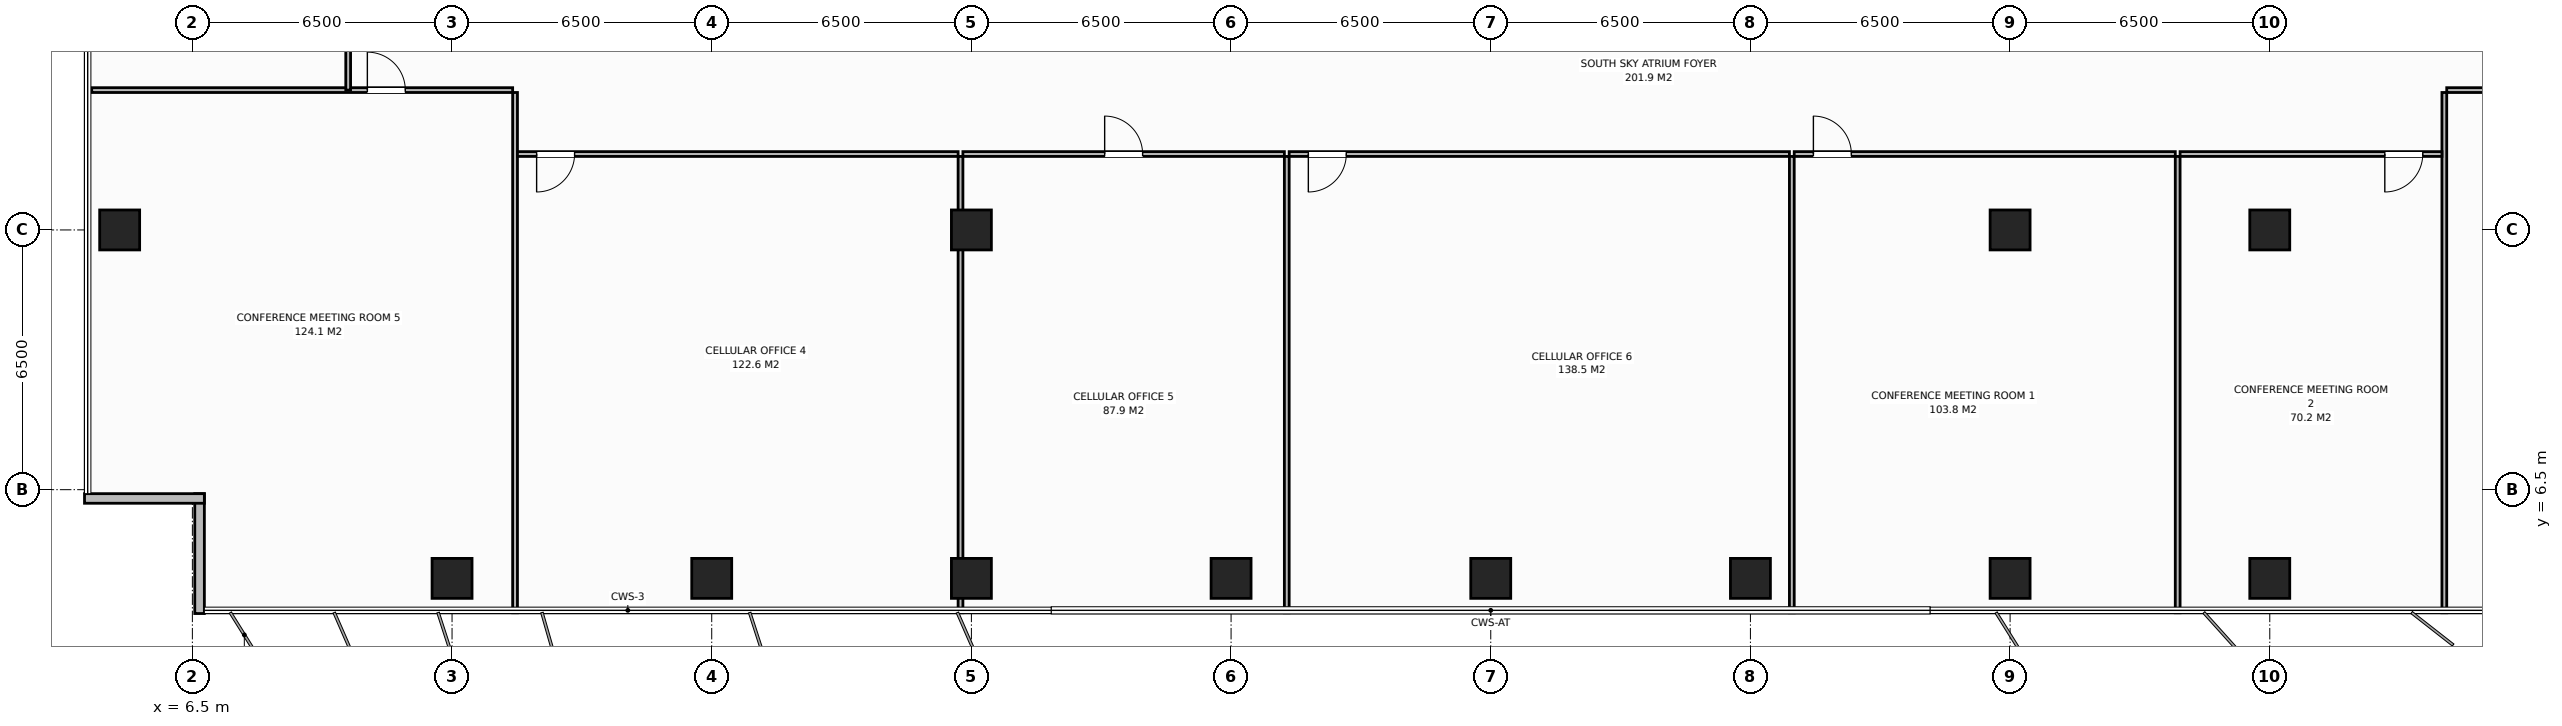
"""IFC4 building model, lengths in metres.
Left out: names, types, materials, properties, quantities, classifications, styles, units other than length and angle.
Written with IfcOpenShell. Run it as: python <this file> out.ifc"""

import sys

from ifc_helpers import new_model, si_unit, direction, frame, frame_2d, origin, origin_2d, place, context, subcontext, project, spatial, rectangle, extrude, element, fill, save


model = new_model("IFC4")
c1 = context("Model", 3, precision=1e-05, world=origin(), true_north=direction((0.0, 1.0)))
c2 = subcontext(c1, "Body", "Model", "MODEL_VIEW")
j1 = project(units=[si_unit("LENGTHUNIT", "METRE"), si_unit("PLANEANGLEUNIT", "RADIAN")], contexts=[c1])
p1 = place(None, origin())
s1 = spatial("IfcSite", under=j1, at=p1, CompositionType="ELEMENT")
p2 = place(p1, origin())
s2 = spatial("IfcBuilding", under=s1, at=p2, CompositionType="ELEMENT")
p3 = place(p2, frame((0.0, 0.0, 193.6)))
s3 = spatial("IfcBuildingStorey", under=s2, at=p3, CompositionType="ELEMENT", Elevation=193.6)
for number, where, z_axis, x_axis in (
    (1, (58.5, 13.0, 0.0), (0.0, 0.0, 1.0), (1.0, 0.0, 0.0)),
    (2, (26.0, 13.0, 0.0), (0.0, 0.0, 1.0), (1.0, 0.0, 0.0)),
    (3, (52.0, 13.0, 0.0), (0.0, 0.0, 1.0), (1.0, 0.0, 0.0)),
    (4, (13.0, 4.28, 0.0), (0.0, 0.0, 1.0), (1.0, 0.0, 0.0)),
    (5, (19.5, 4.28, 0.0), (0.0, 0.0, 1.0), (1.0, 0.0, 0.0)),
    (6, (26.0, 4.28, 0.0), (0.0, 0.0, 1.0), (1.0, 0.0, 0.0)),
    (7, (32.5, 4.28, 0.0), (0.0, 0.0, 1.0), (1.0, 0.0, 0.0)),
    (8, (39.0, 4.28, 0.0), (0.0, 0.0, 1.0), (1.0, 0.0, 0.0)),
    (9, (45.5, 4.28, 0.0), (0.0, 0.0, 1.0), (1.0, 0.0, 0.0)),
    (10, (52.0, 4.28, 0.0), (0.0, 0.0, 1.0), (1.0, 0.0, 0.0)),
    (11, (58.5, 4.28, 0.0), (0.0, 0.0, 1.0), (1.0, 0.0, 0.0)),
    (12, (4.68, 13.0, 0.0), (0.0, 0.0, 1.0), (1.0, 0.0, 0.0)),
):
    element("IfcColumn", number, at=place(p3, frame(where, z_axis=z_axis, x_axis=x_axis)), inside=s3, PredefinedType="COLUMN", context=c2, shape_type="SweptSolid", body=[
        extrude(rectangle(XDim=1.0, YDim=1.0, at=origin_2d()), origin(), (0.0, 0.0, 1.0), 3.8),
    ])
for number, where, z_axis, x_axis in (
    (13, (6.68, 3.4, 0.0), (0.0, 0.0, 1.0), (0.0, 1.0, 0.0)),
    (14, (6.8, 6.28, 0.0), (0.0, 0.0, 1.0), (-1.0, 0.0, 0.0)),
):
    element("IfcWall", number, at=place(p3, frame(where, z_axis=z_axis, x_axis=x_axis)), inside=s3, PredefinedType="STANDARD", context=c2, shape_type="SweptSolid", body=[
        extrude(rectangle(XDim=3.0, YDim=0.24, at=frame_2d((1.5, 0.0))), origin(), (0.0, 0.0, 1.0), 3.52),
    ])
p4 = place(p3, frame((14.577, 3.42, 0.0), z_axis=(0.0, 0.0, 1.0), x_axis=(0.0, 1.0, 0.0)))
e15 = element("IfcWall", 15, at=p4, inside=s3, PredefinedType="PARTITIONING", context=c2, shape_type="SweptSolid", body=[
    extrude(rectangle(XDim=13.02, YDim=0.12, at=frame_2d((6.51, 0.0))), origin(), (0.0, 0.0, 1.0), 3.52),
])
p5 = place(p3, frame((3.98, 16.5, 0.0), z_axis=(0.0, 0.0, 1.0), x_axis=(1.0, 0.0, 0.0)))
e16 = element("IfcWall", 16, at=p5, inside=s3, PredefinedType="PARTITIONING", context=c2, shape_type="SweptSolid", body=[
    extrude(rectangle(XDim=10.537, YDim=0.12, at=frame_2d((5.269, 0.0))), origin(), (0.0, 0.0, 1.0), 3.52),
])
p6 = place(p5, frame((6.9, 0.0, 0.0)))
e17 = element("IfcOpeningElement", 17, at=p6, cuts=e16, PredefinedType="OPENING", context=c2, shape_type="SweptSolid", body=[
    extrude(rectangle(XDim=0.95, YDim=2.15, at=frame_2d((0.475, 1.075))), frame((0.0, 0.07, 0.0), z_axis=(0.0, -1.0, 0.0), x_axis=(1.0, 0.0, 0.0)), (0.0, 0.0, 1.0), 0.14),
])
p7 = place(p3, frame((25.727, 3.42, 0.0), z_axis=(0.0, 0.0, 1.0), x_axis=(0.0, 1.0, 0.0)))
e18 = element("IfcWall", 18, at=p7, inside=s3, PredefinedType="PARTITIONING", context=c2, shape_type="SweptSolid", body=[
    extrude(rectangle(XDim=11.42, YDim=0.12, at=frame_2d((5.71, 0.0))), origin(), (0.0, 0.0, 1.0), 3.52),
])
p8 = place(p3, frame((14.637, 14.9, 0.0), z_axis=(0.0, 0.0, 1.0), x_axis=(1.0, 0.0, 0.0)))
e19 = element("IfcWall", 19, at=p8, inside=s3, PredefinedType="PARTITIONING", context=c2, shape_type="SweptSolid", body=[
    extrude(rectangle(XDim=11.03, YDim=0.12, at=frame_2d((5.515, 0.0))), origin(), (0.0, 0.0, 1.0), 3.52),
])
p9 = place(p8, frame((0.48, 0.0, 0.0)))
e20 = element("IfcOpeningElement", 20, at=p9, cuts=e19, PredefinedType="OPENING", context=c2, shape_type="SweptSolid", body=[
    extrude(rectangle(XDim=0.95, YDim=2.15, at=frame_2d((0.475, 1.075))), frame((0.0, 0.07, 0.0), z_axis=(0.0, -1.0, 0.0), x_axis=(1.0, 0.0, 0.0)), (0.0, 0.0, 1.0), 0.14),
])
p10 = place(p3, frame((33.894, 3.42, 0.0), z_axis=(0.0, 0.0, 1.0), x_axis=(0.0, 1.0, 0.0)))
e21 = element("IfcWall", 21, at=p10, inside=s3, PredefinedType="PARTITIONING", context=c2, shape_type="SweptSolid", body=[
    extrude(rectangle(XDim=11.42, YDim=0.12, at=frame_2d((5.71, 0.0))), origin(), (0.0, 0.0, 1.0), 3.52),
])
p11 = place(p3, frame((25.787, 14.9, 0.0), z_axis=(0.0, 0.0, 1.0), x_axis=(1.0, 0.0, 0.0)))
e22 = element("IfcWall", 22, at=p11, inside=s3, PredefinedType="PARTITIONING", context=c2, shape_type="SweptSolid", body=[
    extrude(rectangle(XDim=8.047, YDim=0.12, at=frame_2d((4.023, 0.0))), origin(), (0.0, 0.0, 1.0), 3.52),
])
p12 = place(p11, frame((3.548, 0.0, 0.0)))
e23 = element("IfcOpeningElement", 23, at=p12, cuts=e22, PredefinedType="OPENING", context=c2, shape_type="SweptSolid", body=[
    extrude(rectangle(XDim=0.95, YDim=2.15, at=frame_2d((0.475, 1.075))), frame((0.0, 0.07, 0.0), z_axis=(0.0, -1.0, 0.0), x_axis=(1.0, 0.0, 0.0)), (0.0, 0.0, 1.0), 0.14),
])
p13 = place(p3, frame((46.536, 3.42, 0.0), z_axis=(0.0, 0.0, 1.0), x_axis=(0.0, 1.0, 0.0)))
e24 = element("IfcWall", 24, at=p13, inside=s3, PredefinedType="PARTITIONING", context=c2, shape_type="SweptSolid", body=[
    extrude(rectangle(XDim=11.42, YDim=0.12, at=frame_2d((5.71, 0.0))), origin(), (0.0, 0.0, 1.0), 3.52),
])
p14 = place(p3, frame((33.954, 14.9, 0.0), z_axis=(0.0, 0.0, 1.0), x_axis=(1.0, 0.0, 0.0)))
e25 = element("IfcWall", 25, at=p14, inside=s3, PredefinedType="PARTITIONING", context=c2, shape_type="SweptSolid", body=[
    extrude(rectangle(XDim=12.522, YDim=0.12, at=frame_2d((6.261, 0.0))), origin(), (0.0, 0.0, 1.0), 3.52),
])
p15 = place(p14, frame((0.48, 0.0, 0.0)))
e26 = element("IfcOpeningElement", 26, at=p15, cuts=e25, PredefinedType="OPENING", context=c2, shape_type="SweptSolid", body=[
    extrude(rectangle(XDim=0.95, YDim=2.15, at=frame_2d((0.475, 1.075))), frame((0.0, 0.07, 0.0), z_axis=(0.0, -1.0, 0.0), x_axis=(1.0, 0.0, 0.0)), (0.0, 0.0, 1.0), 0.14),
])
p16 = place(p3, frame((56.195, 3.42, 0.0), z_axis=(0.0, 0.0, 1.0), x_axis=(0.0, 1.0, 0.0)))
e27 = element("IfcWall", 27, at=p16, inside=s3, PredefinedType="PARTITIONING", context=c2, shape_type="SweptSolid", body=[
    extrude(rectangle(XDim=11.42, YDim=0.12, at=frame_2d((5.71, 0.0))), origin(), (0.0, 0.0, 1.0), 3.52),
])
p17 = place(p3, frame((46.596, 14.9, 0.0), z_axis=(0.0, 0.0, 1.0), x_axis=(1.0, 0.0, 0.0)))
e28 = element("IfcWall", 28, at=p17, inside=s3, PredefinedType="PARTITIONING", context=c2, shape_type="SweptSolid", body=[
    extrude(rectangle(XDim=9.539, YDim=0.12, at=frame_2d((4.769, 0.0))), origin(), (0.0, 0.0, 1.0), 3.52),
])
p18 = place(p17, frame((0.48, 0.0, 0.0)))
e29 = element("IfcOpeningElement", 29, at=p18, cuts=e28, PredefinedType="OPENING", context=c2, shape_type="SweptSolid", body=[
    extrude(rectangle(XDim=0.95, YDim=2.15, at=frame_2d((0.475, 1.075))), frame((0.0, 0.07, 0.0), z_axis=(0.0, -1.0, 0.0), x_axis=(1.0, 0.0, 0.0)), (0.0, 0.0, 1.0), 0.14),
])
p19 = place(p3, frame((62.87, 3.42, 0.0), z_axis=(0.0, 0.0, 1.0), x_axis=(0.0, 1.0, 0.0)))
e30 = element("IfcWall", 30, at=p19, inside=s3, PredefinedType="PARTITIONING", context=c2, shape_type="SweptSolid", body=[
    extrude(rectangle(XDim=13.02, YDim=0.12, at=frame_2d((6.51, 0.0))), origin(), (0.0, 0.0, 1.0), 3.52),
])
p20 = place(p3, frame((56.255, 14.9, 0.0), z_axis=(0.0, 0.0, 1.0), x_axis=(1.0, 0.0, 0.0)))
e31 = element("IfcWall", 31, at=p20, inside=s3, PredefinedType="PARTITIONING", context=c2, shape_type="SweptSolid", body=[
    extrude(rectangle(XDim=6.555, YDim=0.12, at=frame_2d((3.277, 0.0))), origin(), (0.0, 0.0, 1.0), 3.52),
])
p21 = place(p20, frame((5.125, 0.0, 0.0)))
e32 = element("IfcOpeningElement", 32, at=p21, cuts=e31, PredefinedType="OPENING", context=c2, shape_type="SweptSolid", body=[
    extrude(rectangle(XDim=0.95, YDim=2.15, at=frame_2d((0.475, 1.075))), frame((0.0, 0.07, 0.0), z_axis=(0.0, -1.0, 0.0), x_axis=(1.0, 0.0, 0.0)), (0.0, 0.0, 1.0), 0.14),
])
p22 = place(p3, frame((62.93, 16.5, 0.0), z_axis=(0.0, 0.0, 1.0), x_axis=(1.0, 0.0, 0.0)))
e33 = element("IfcWall", 33, at=p22, inside=s3, PredefinedType="PARTITIONING", context=c2, shape_type="SweptSolid", body=[
    extrude(rectangle(XDim=11.09, YDim=0.12, at=frame_2d((5.545, 0.0))), origin(), (0.0, 0.0, 1.0), 3.52),
])
p23 = place(p22, frame((3.24, 0.0, 0.0)))
e34 = element("IfcOpeningElement", 34, at=p23, cuts=e33, PredefinedType="OPENING", context=c2, shape_type="SweptSolid", body=[
    extrude(rectangle(XDim=0.95, YDim=2.15, at=frame_2d((0.475, 1.075))), frame((0.0, 0.07, 0.0), z_axis=(0.0, -1.0, 0.0), x_axis=(1.0, 0.0, 0.0)), (0.0, 0.0, 1.0), 0.14),
])
p24 = place(p3, frame((10.4, 16.5, 0.0), z_axis=(0.0, 0.0, 1.0), x_axis=(0.0, 1.0, 0.0)))
e35 = element("IfcWall", 35, at=p24, inside=s3, PredefinedType="PARTITIONING", context=c2, shape_type="SweptSolid", body=[
    extrude(rectangle(XDim=6.333, YDim=0.12, at=frame_2d((3.167, 0.0))), origin(), (0.0, 0.0, 1.0), 3.52),
])
p25 = place(p24, frame((3.742, 0.0, 0.0)))
e36 = element("IfcOpeningElement", 36, at=p25, cuts=e35, PredefinedType="OPENING", context=c2, shape_type="SweptSolid", body=[
    extrude(rectangle(XDim=0.95, YDim=2.15, at=frame_2d((0.475, 1.075))), frame((0.0, 0.07, 0.0), z_axis=(0.0, -1.0, 0.0), x_axis=(1.0, 0.0, 0.0)), (0.0, 0.0, 1.0), 0.14),
])
p26 = place(p6, origin())
e37 = element("IfcDoor", 37, at=p26, inside=s3, OperationType="SINGLE_SWING_LEFT", PredefinedType="DOOR", context=c2, shape_type="SweptSolid", body=[
    extrude(rectangle(XDim=0.95, YDim=2.15, at=frame_2d((0.475, 1.075))), frame((0.0, 0.025, 0.0), z_axis=(0.0, -1.0, 0.0), x_axis=(1.0, 0.0, 0.0)), (0.0, 0.0, 1.0), 0.05),
])
fill(e17, e37)
p27 = place(p9, origin())
e38 = element("IfcDoor", 38, at=p27, inside=s3, OperationType="SINGLE_SWING_RIGHT", PredefinedType="DOOR", context=c2, shape_type="SweptSolid", body=[
    extrude(rectangle(XDim=0.95, YDim=2.15, at=frame_2d((0.475, 1.075))), frame((0.0, 0.025, 0.0), z_axis=(0.0, -1.0, 0.0), x_axis=(1.0, 0.0, 0.0)), (0.0, 0.0, 1.0), 0.05),
])
fill(e20, e38)
p28 = place(p12, origin())
e39 = element("IfcDoor", 39, at=p28, inside=s3, OperationType="SINGLE_SWING_LEFT", PredefinedType="DOOR", context=c2, shape_type="SweptSolid", body=[
    extrude(rectangle(XDim=0.95, YDim=2.15, at=frame_2d((0.475, 1.075))), frame((0.0, 0.025, 0.0), z_axis=(0.0, -1.0, 0.0), x_axis=(1.0, 0.0, 0.0)), (0.0, 0.0, 1.0), 0.05),
])
fill(e23, e39)
p29 = place(p15, origin())
e40 = element("IfcDoor", 40, at=p29, inside=s3, OperationType="SINGLE_SWING_RIGHT", PredefinedType="DOOR", context=c2, shape_type="SweptSolid", body=[
    extrude(rectangle(XDim=0.95, YDim=2.15, at=frame_2d((0.475, 1.075))), frame((0.0, 0.025, 0.0), z_axis=(0.0, -1.0, 0.0), x_axis=(1.0, 0.0, 0.0)), (0.0, 0.0, 1.0), 0.05),
])
fill(e26, e40)
p30 = place(p18, origin())
e41 = element("IfcDoor", 41, at=p30, inside=s3, OperationType="SINGLE_SWING_LEFT", PredefinedType="DOOR", context=c2, shape_type="SweptSolid", body=[
    extrude(rectangle(XDim=0.95, YDim=2.15, at=frame_2d((0.475, 1.075))), frame((0.0, 0.025, 0.0), z_axis=(0.0, -1.0, 0.0), x_axis=(1.0, 0.0, 0.0)), (0.0, 0.0, 1.0), 0.05),
])
fill(e29, e41)
p31 = place(p21, origin())
e42 = element("IfcDoor", 42, at=p31, inside=s3, OperationType="SINGLE_SWING_RIGHT", PredefinedType="DOOR", context=c2, shape_type="SweptSolid", body=[
    extrude(rectangle(XDim=0.95, YDim=2.15, at=frame_2d((0.475, 1.075))), frame((0.0, 0.025, 0.0), z_axis=(0.0, -1.0, 0.0), x_axis=(1.0, 0.0, 0.0)), (0.0, 0.0, 1.0), 0.05),
])
fill(e32, e42)
save(model, sys.argv[1])
